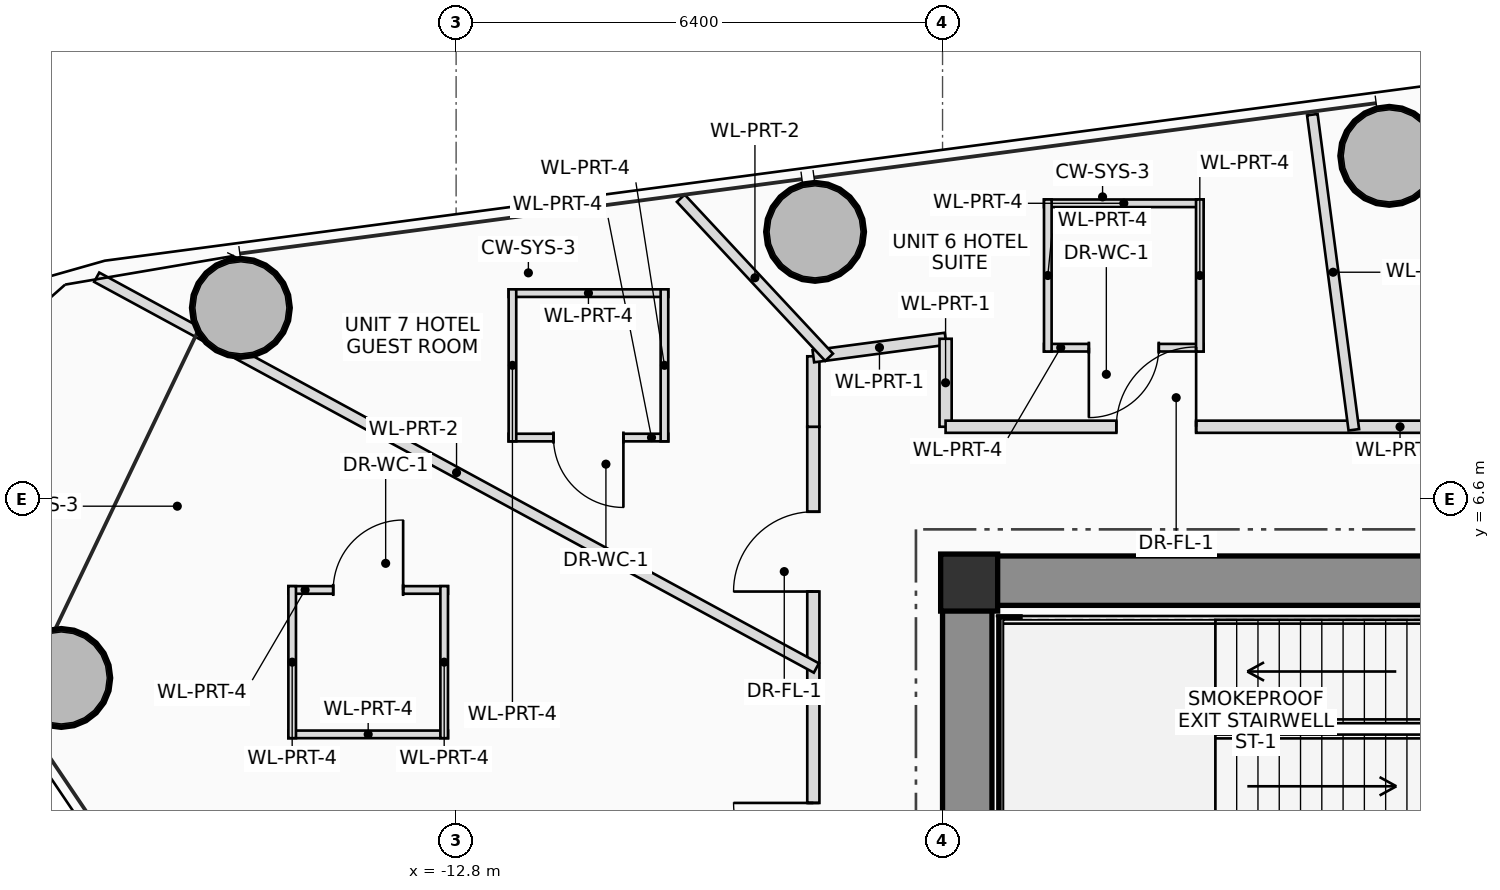
"""IFC4 building model, lengths in metres.
Left out: names, types, materials, properties, quantities, classifications, styles, units other than length and angle.
Written with IfcOpenShell. Run it as: python <this file> out.ifc"""

import sys

from ifc_helpers import new_model, si_unit, direction, frame, frame_2d, origin, origin_2d, place, context, subcontext, project, spatial, rectangle, hollow_circle, extrude, source, transform, mapped, element, fill, save


model = new_model("IFC4")
c1 = context("Model", 3, precision=1e-05, world=origin(), true_north=direction((0.0, 1.0)))
c2 = subcontext(c1, "Body", "Model", "MODEL_VIEW")
j1 = project(units=[si_unit("LENGTHUNIT", "METRE"), si_unit("PLANEANGLEUNIT", "RADIAN")], contexts=[c1])
p1 = place(None, origin())
s1 = spatial("IfcSite", under=j1, at=p1, CompositionType="ELEMENT")
p2 = place(p1, origin())
s2 = spatial("IfcBuilding", under=s1, at=p2, CompositionType="ELEMENT")
p3 = place(p2, frame((0.0, 0.0, 172.55)))
s3 = spatial("IfcBuildingStorey", under=s2, at=p3, CompositionType="ELEMENT", Elevation=172.55)
m1 = source(origin(), c2, "Body", "SweptSolid", [
    extrude(rectangle(XDim=0.75, YDim=0.75, at=origin_2d()), origin(), (0.0, 0.0, 1.0), 3.45),
])
p4 = place(p3, frame((-6.05, 5.5, 0.0), z_axis=(0.0, 0.0, 1.0), x_axis=(1.0, 0.0, 0.0)))
e1 = element("IfcColumn", 1, at=p4, inside=s3, PredefinedType="COLUMN", context=c2, shape_type="MappedRepresentation", body=[
    mapped(m1, transform((0.0, 0.0, 0.0), scale=1.0)),
])
p5 = place(p3, frame((-6.4, 5.525, 0.0), z_axis=(0.0, 0.0, 1.0), x_axis=(1.0, 0.0, 0.0)))
e2 = element("IfcWall", 2, at=p5, inside=s3, PredefinedType="SHEAR", context=c2, shape_type="SweptSolid", body=[
    extrude(rectangle(XDim=12.8, YDim=0.65, at=frame_2d((6.4, 0.0))), origin(), (0.0, 0.0, 1.0), 3.45),
])
p6 = place(p5, frame((8.6, 0.0, 0.0)))
e3 = element("IfcOpeningElement", 3, at=p6, cuts=e2, PredefinedType="OPENING", context=c2, shape_type="SweptSolid", body=[
    extrude(rectangle(XDim=1.2, YDim=2.2, at=frame_2d((0.6, 1.1))), frame((0.0, 0.335, 0.0), z_axis=(0.0, -1.0, 0.0), x_axis=(1.0, 0.0, 0.0)), (0.0, 0.0, 1.0), 0.67),
])
p7 = place(p3, frame((-6.075, 1.75, 0.0), z_axis=(0.0, 0.0, 1.0), x_axis=(0.0, 1.0, 0.0)))
e4 = element("IfcWall", 4, at=p7, inside=s3, PredefinedType="SHEAR", context=c2, shape_type="SweptSolid", body=[
    extrude(rectangle(XDim=3.45, YDim=0.65, at=frame_2d((1.725, 0.0))), origin(), (0.0, 0.0, 1.0), 3.45),
])
p8 = place(p3, frame((-5.52, 2.3, 0.0), z_axis=(0.0, 0.0, 1.0), x_axis=(0.0, 1.0, 0.0)))
e5 = element("IfcWall", 5, at=p8, inside=s3, PredefinedType="SHEAR", context=c2, shape_type="SweptSolid", body=[
    extrude(rectangle(XDim=2.75, YDim=0.28, at=frame_2d((1.375, 0.0))), origin(), (0.0, 0.0, 1.0), 3.45),
])
m2 = source(origin(), c2, "Body", "SweptSolid", [
    extrude(hollow_circle(Radius=0.65, WallThickness=0.045, at=origin_2d()), origin(), (0.0, 0.0, 1.0), 3.45),
])
for number, where, z_axis, x_axis in (
    (6, (-0.522, 11.114, 0.0), (0.0, 0.0, 1.0), (1.0, 0.0, 0.0)),
    (7, (-8.077, 10.114, 0.0), (0.0, 0.0, 1.0), (1.0, 0.0, 0.0)),
    (8, (-15.632, 9.114, 0.0), (0.0, 0.0, 1.0), (1.0, 0.0, 0.0)),
    (9, (-17.995, 4.245, 0.0), (0.0, 0.0, 1.0), (1.0, 0.0, 0.0)),
):
    element("IfcColumn", number, at=place(p3, frame(where, z_axis=z_axis, x_axis=x_axis)), inside=s3, PredefinedType="COLUMN", context=c2, shape_type="MappedRepresentation", body=[
        mapped(m2, transform((0.0, 0.0, 0.0), scale=1.0)),
    ])
p9 = place(p3, frame((-5.065, 10.49, 0.0), z_axis=(0.0, 0.0, 1.0), x_axis=(1.0, 0.0, 0.0)))
e10 = element("IfcWall", 10, at=p9, inside=s3, PredefinedType="PARTITIONING", context=c2, shape_type="SweptSolid", body=[
    extrude(rectangle(XDim=2.1, YDim=0.1, at=frame_2d((1.05, 0.0))), origin(), (0.0, 0.0, 1.0), 2.765),
])
p10 = place(p3, frame((-2.965, 8.59, 0.0), z_axis=(0.0, 0.0, 1.0), x_axis=(-1.0, 0.0, 0.0)))
e11 = element("IfcWall", 11, at=p10, inside=s3, PredefinedType="PARTITIONING", context=c2, shape_type="SweptSolid", body=[
    extrude(rectangle(XDim=2.1, YDim=0.1, at=frame_2d((1.05, 0.0))), origin(), (0.0, 0.0, 1.0), 2.605),
])
p11 = place(p10, frame((0.59, 0.0, 0.0)))
e12 = element("IfcOpeningElement", 12, at=p11, cuts=e11, PredefinedType="OPENING", context=c2, shape_type="SweptSolid", body=[
    extrude(rectangle(XDim=0.92, YDim=2.1, at=frame_2d((0.46, 1.05))), frame((0.0, 0.06, 0.0), z_axis=(0.0, -1.0, 0.0), x_axis=(1.0, 0.0, 0.0)), (0.0, 0.0, 1.0), 0.12),
])
p12 = place(p3, frame((-3.015, 10.54, 0.0), z_axis=(0.0, 0.0, 1.0), x_axis=(0.0, -1.0, 0.0)))
e13 = element("IfcWall", 13, at=p12, inside=s3, PredefinedType="PARTITIONING", context=c2, shape_type="SweptSolid", body=[
    extrude(rectangle(XDim=2.0, YDim=0.1, at=frame_2d((1.0, 0.0))), origin(), (0.0, 0.0, 1.0), 2.605),
])
p13 = place(p3, frame((-5.015, 8.54, 0.0), z_axis=(0.0, 0.0, 1.0), x_axis=(0.0, 1.0, 0.0)))
e14 = element("IfcWall", 14, at=p13, inside=s3, PredefinedType="PARTITIONING", context=c2, shape_type="SweptSolid", body=[
    extrude(rectangle(XDim=2.0, YDim=0.1, at=frame_2d((1.0, 0.0))), origin(), (0.0, 0.0, 1.0), 2.765),
])
p14 = place(p3, frame((-12.109, 9.308, 0.0), z_axis=(0.0, 0.0, 1.0), x_axis=(1.0, 0.0, 0.0)))
e15 = element("IfcWall", 15, at=p14, inside=s3, PredefinedType="PARTITIONING", context=c2, shape_type="SweptSolid", body=[
    extrude(rectangle(XDim=2.1, YDim=0.1, at=frame_2d((1.05, 0.0))), origin(), (0.0, 0.0, 1.0), 3.25),
])
p15 = place(p3, frame((-10.009, 7.408, 0.0), z_axis=(0.0, 0.0, 1.0), x_axis=(-1.0, 0.0, 0.0)))
e16 = element("IfcWall", 16, at=p15, inside=s3, PredefinedType="PARTITIONING", context=c2, shape_type="SweptSolid", body=[
    extrude(rectangle(XDim=2.1, YDim=0.1, at=frame_2d((1.05, 0.0))), origin(), (0.0, 0.0, 1.0), 2.605),
])
p16 = place(p15, frame((0.59, 0.0, 0.0)))
e17 = element("IfcOpeningElement", 17, at=p16, cuts=e16, PredefinedType="OPENING", context=c2, shape_type="SweptSolid", body=[
    extrude(rectangle(XDim=0.92, YDim=2.1, at=frame_2d((0.46, 1.05))), frame((0.0, 0.06, 0.0), z_axis=(0.0, -1.0, 0.0), x_axis=(1.0, 0.0, 0.0)), (0.0, 0.0, 1.0), 0.12),
])
p17 = place(p3, frame((-10.059, 9.358, 0.0), z_axis=(0.0, 0.0, 1.0), x_axis=(0.0, -1.0, 0.0)))
e18 = element("IfcWall", 18, at=p17, inside=s3, PredefinedType="PARTITIONING", context=c2, shape_type="SweptSolid", body=[
    extrude(rectangle(XDim=2.0, YDim=0.1, at=frame_2d((1.0, 0.0))), origin(), (0.0, 0.0, 1.0), 2.805),
])
p18 = place(p3, frame((-12.059, 7.358, 0.0), z_axis=(0.0, 0.0, 1.0), x_axis=(0.0, 1.0, 0.0)))
e19 = element("IfcWall", 19, at=p18, inside=s3, PredefinedType="PARTITIONING", context=c2, shape_type="SweptSolid", body=[
    extrude(rectangle(XDim=2.0, YDim=0.1, at=frame_2d((1.0, 0.0))), origin(), (0.0, 0.0, 1.0), 2.605),
])
p19 = place(p3, frame((-15.007, 5.403, 0.0), z_axis=(0.0, 0.0, 1.0), x_axis=(1.0, 0.0, 0.0)))
e20 = element("IfcWall", 20, at=p19, inside=s3, PredefinedType="PARTITIONING", context=c2, shape_type="SweptSolid", body=[
    extrude(rectangle(XDim=2.1, YDim=0.1, at=frame_2d((1.05, 0.0))), origin(), (0.0, 0.0, 1.0), 2.905),
])
p20 = place(p19, frame((0.59, 0.0, 0.0)))
e21 = element("IfcOpeningElement", 21, at=p20, cuts=e20, PredefinedType="OPENING", context=c2, shape_type="SweptSolid", body=[
    extrude(rectangle(XDim=0.92, YDim=2.1, at=frame_2d((0.46, 1.05))), frame((0.0, 0.06, 0.0), z_axis=(0.0, -1.0, 0.0), x_axis=(1.0, 0.0, 0.0)), (0.0, 0.0, 1.0), 0.12),
])
p21 = place(p3, frame((-12.907, 3.503, 0.0), z_axis=(0.0, 0.0, 1.0), x_axis=(-1.0, 0.0, 0.0)))
e22 = element("IfcWall", 22, at=p21, inside=s3, PredefinedType="PARTITIONING", context=c2, shape_type="SweptSolid", body=[
    extrude(rectangle(XDim=2.1, YDim=0.1, at=frame_2d((1.05, 0.0))), origin(), (0.0, 0.0, 1.0), 2.905),
])
for number, where, z_axis, x_axis in (
    (23, (-12.957, 5.453, 0.0), (0.0, 0.0, 1.0), (0.0, -1.0, 0.0)),
    (24, (-14.957, 3.453, 0.0), (0.0, 0.0, 1.0), (0.0, 1.0, 0.0)),
):
    element("IfcWall", number, at=place(p3, frame(where, z_axis=z_axis, x_axis=x_axis)), inside=s3, PredefinedType="PARTITIONING", context=c2, shape_type="SweptSolid", body=[
        extrude(rectangle(XDim=2.0, YDim=0.1, at=frame_2d((1.0, 0.0))), origin(), (0.0, 0.0, 1.0), 2.605),
    ])
p22 = place(p3, frame((-8.1, -7.528, 0.0), z_axis=(0.0, 0.0, 1.0), x_axis=(0.0, 1.0, 0.0)))
e25 = element("IfcWall", 25, at=p22, inside=s3, PredefinedType="PARTITIONING", context=c2, shape_type="SweptSolid", body=[
    extrude(rectangle(XDim=15.078, YDim=0.16, at=frame_2d((7.539, 0.0))), origin(), (0.0, 0.0, 1.0), 2.605),
])
p23 = place(p22, frame((3.265, 0.0, 0.0)))
e26 = element("IfcOpeningElement", 26, at=p23, cuts=e25, PredefinedType="OPENING", context=c2, shape_type="SweptSolid", body=[
    extrude(rectangle(XDim=0.9, YDim=2.05, at=frame_2d((0.45, 1.025))), frame((0.0, 0.09, 0.0), z_axis=(0.0, -1.0, 0.0), x_axis=(1.0, 0.0, 0.0)), (0.0, 0.0, 1.0), 0.18),
])
p24 = place(p22, frame((9.079, 0.0, 0.0)))
e27 = element("IfcOpeningElement", 27, at=p24, cuts=e25, PredefinedType="OPENING", context=c2, shape_type="SweptSolid", body=[
    extrude(rectangle(XDim=1.05, YDim=2.2, at=frame_2d((0.525, 1.1))), frame((0.0, 0.09, 0.0), z_axis=(0.0, -1.0, 0.0), x_axis=(1.0, 0.0, 0.0)), (0.0, 0.0, 1.0), 0.18),
])
p25 = place(p22, frame((12.91, 0.0, 0.0)))
e28 = element("IfcOpeningElement", 28, at=p25, cuts=e25, PredefinedType="OPENING", context=c2, shape_type="SweptSolid", body=[
    extrude(rectangle(XDim=1.05, YDim=2.2, at=frame_2d((0.525, 1.1))), frame((0.0, 0.09, 0.0), z_axis=(0.0, -1.0, 0.0), x_axis=(1.0, 0.0, 0.0)), (0.0, 0.0, 1.0), 0.18),
])
p26 = place(p3, frame((-8.1, 7.55, 0.0), z_axis=(0.0, 0.0, 1.0), x_axis=(0.0, 1.0, 0.0)))
e29 = element("IfcWall", 29, at=p26, inside=s3, PredefinedType="PARTITIONING", context=c2, shape_type="SweptSolid", body=[
    extrude(rectangle(XDim=0.927, YDim=0.16, at=frame_2d((0.463, 0.0))), origin(), (0.0, 0.0, 1.0), 2.805),
])
p27 = place(p3, frame((-8.1, 8.477, 0.0), z_axis=(0.0, 0.0, 1.0), x_axis=(0.991341723558, 0.131307224223, 0.0)))
e30 = element("IfcWall", 30, at=p27, inside=s3, PredefinedType="PARTITIONING", context=c2, shape_type="SweptSolid", body=[
    extrude(rectangle(XDim=1.755, YDim=0.16, at=frame_2d((0.877, 0.0))), origin(), (0.0, 0.0, 1.0), 2.605),
])
p28 = place(p3, frame((-6.36, 8.708, 0.0), z_axis=(0.0, 0.0, 1.0), x_axis=(0.0, -1.0, 0.0)))
e31 = element("IfcWall", 31, at=p28, inside=s3, PredefinedType="PARTITIONING", context=c2, shape_type="SweptSolid", body=[
    extrude(rectangle(XDim=1.157, YDim=0.16, at=frame_2d((0.579, 0.0))), origin(), (0.0, 0.0, 1.0), 2.805),
])
p29 = place(p3, frame((-6.36, 7.55, 0.0), z_axis=(0.0, 0.0, 1.0), x_axis=(1.0, 0.0, 0.0)))
e32 = element("IfcWall", 32, at=p29, inside=s3, PredefinedType="PARTITIONING", context=c2, shape_type="SweptSolid", body=[
    extrude(rectangle(XDim=11.61, YDim=0.16, at=frame_2d((5.805, 0.0))), origin(), (0.0, 0.0, 1.0), 2.605),
])
p30 = place(p29, frame((2.246, 0.0, 0.0)))
e33 = element("IfcOpeningElement", 33, at=p30, cuts=e32, PredefinedType="OPENING", context=c2, shape_type="SweptSolid", body=[
    extrude(rectangle(XDim=1.05, YDim=2.2, at=frame_2d((0.525, 1.1))), frame((0.0, 0.09, 0.0), z_axis=(0.0, -1.0, 0.0), x_axis=(1.0, 0.0, 0.0)), (0.0, 0.0, 1.0), 0.18),
])
p31 = place(p29, frame((8.662, 0.0, 0.0)))
e34 = element("IfcOpeningElement", 34, at=p31, cuts=e32, PredefinedType="OPENING", context=c2, shape_type="SweptSolid", body=[
    extrude(rectangle(XDim=1.0, YDim=2.25, at=frame_2d((0.5, 1.125))), frame((0.0, 0.09, 0.0), z_axis=(0.0, -1.0, 0.0), x_axis=(1.0, 0.0, 0.0)), (0.0, 0.0, 1.0), 0.18),
])
p32 = place(p3, frame((-0.989, 7.51, 0.0), z_axis=(0.0, 0.0, 1.0), x_axis=(-0.130484717168, 0.991450320785, 0.0)))
e35 = element("IfcWall", 35, at=p32, inside=s3, PredefinedType="PARTITIONING", context=c2, shape_type="SweptSolid", body=[
    extrude(rectangle(XDim=4.182, YDim=0.14, at=frame_2d((2.091, 0.0))), origin(), (0.0, 0.0, 1.0), 2.605),
])
p33 = place(p3, frame((-7.893, 8.464, 0.0), z_axis=(0.0, 0.0, 1.0), x_axis=(-0.682011061147, 0.73134185746, 0.0)))
e36 = element("IfcWall", 36, at=p33, inside=s3, PredefinedType="PARTITIONING", context=c2, shape_type="SweptSolid", body=[
    extrude(rectangle(XDim=2.861, YDim=0.14, at=frame_2d((1.43, 0.0))), origin(), (0.0, 0.0, 1.0), 2.765),
])
p34 = place(p3, frame((-8.06, 4.376, 0.0), z_axis=(0.0, 0.0, 1.0), x_axis=(-0.878817054271, 0.477158867802, 0.0)))
e37 = element("IfcWall", 37, at=p34, inside=s3, PredefinedType="PARTITIONING", context=c2, shape_type="SweptSolid", body=[
    extrude(rectangle(XDim=10.774, YDim=0.14, at=frame_2d((5.387, 0.0))), origin(), (0.0, 0.0, 1.0), 2.605),
])
p35 = place(p11, origin())
e38 = element("IfcDoor", 38, at=p35, inside=s3, OperationType="SINGLE_SWING_RIGHT", PredefinedType="DOOR", context=c2, shape_type="SweptSolid", body=[
    extrude(rectangle(XDim=0.92, YDim=2.1, at=frame_2d((0.46, 1.05))), frame((0.0, 0.025, 0.0), z_axis=(0.0, -1.0, 0.0), x_axis=(1.0, 0.0, 0.0)), (0.0, 0.0, 1.0), 0.05),
])
fill(e12, e38)
p36 = place(p16, origin())
e39 = element("IfcDoor", 39, at=p36, inside=s3, OperationType="SINGLE_SWING_LEFT", PredefinedType="DOOR", context=c2, shape_type="SweptSolid", body=[
    extrude(rectangle(XDim=0.92, YDim=2.1, at=frame_2d((0.46, 1.05))), frame((0.0, 0.025, 0.0), z_axis=(0.0, -1.0, 0.0), x_axis=(1.0, 0.0, 0.0)), (0.0, 0.0, 1.0), 0.05),
])
fill(e17, e39)
p37 = place(p20, origin())
e40 = element("IfcDoor", 40, at=p37, inside=s3, OperationType="SINGLE_SWING_RIGHT", PredefinedType="DOOR", context=c2, shape_type="SweptSolid", body=[
    extrude(rectangle(XDim=0.92, YDim=2.1, at=frame_2d((0.46, 1.05))), frame((0.0, 0.025, 0.0), z_axis=(0.0, -1.0, 0.0), x_axis=(1.0, 0.0, 0.0)), (0.0, 0.0, 1.0), 0.05),
])
fill(e21, e40)
p38 = place(p24, origin())
e41 = element("IfcDoor", 41, at=p38, inside=s3, OperationType="SINGLE_SWING_RIGHT", PredefinedType="DOOR", context=c2, shape_type="SweptSolid", body=[
    extrude(rectangle(XDim=1.05, YDim=2.2, at=frame_2d((0.525, 1.1))), frame((0.0, 0.025, 0.0), z_axis=(0.0, -1.0, 0.0), x_axis=(1.0, 0.0, 0.0)), (0.0, 0.0, 1.0), 0.05),
])
fill(e27, e41)
p39 = place(p25, origin())
e42 = element("IfcDoor", 42, at=p39, inside=s3, OperationType="SINGLE_SWING_LEFT", PredefinedType="DOOR", context=c2, shape_type="SweptSolid", body=[
    extrude(rectangle(XDim=1.05, YDim=2.2, at=frame_2d((0.525, 1.1))), frame((0.0, 0.025, 0.0), z_axis=(0.0, -1.0, 0.0), x_axis=(1.0, 0.0, 0.0)), (0.0, 0.0, 1.0), 0.05),
])
fill(e28, e42)
p40 = place(p30, origin())
e43 = element("IfcDoor", 43, at=p40, inside=s3, OperationType="SINGLE_SWING_RIGHT", PredefinedType="DOOR", context=c2, shape_type="SweptSolid", body=[
    extrude(rectangle(XDim=1.05, YDim=2.2, at=frame_2d((0.525, 1.1))), frame((0.0, 0.025, 0.0), z_axis=(0.0, -1.0, 0.0), x_axis=(1.0, 0.0, 0.0)), (0.0, 0.0, 1.0), 0.05),
])
fill(e33, e43)
save(model, sys.argv[1])
